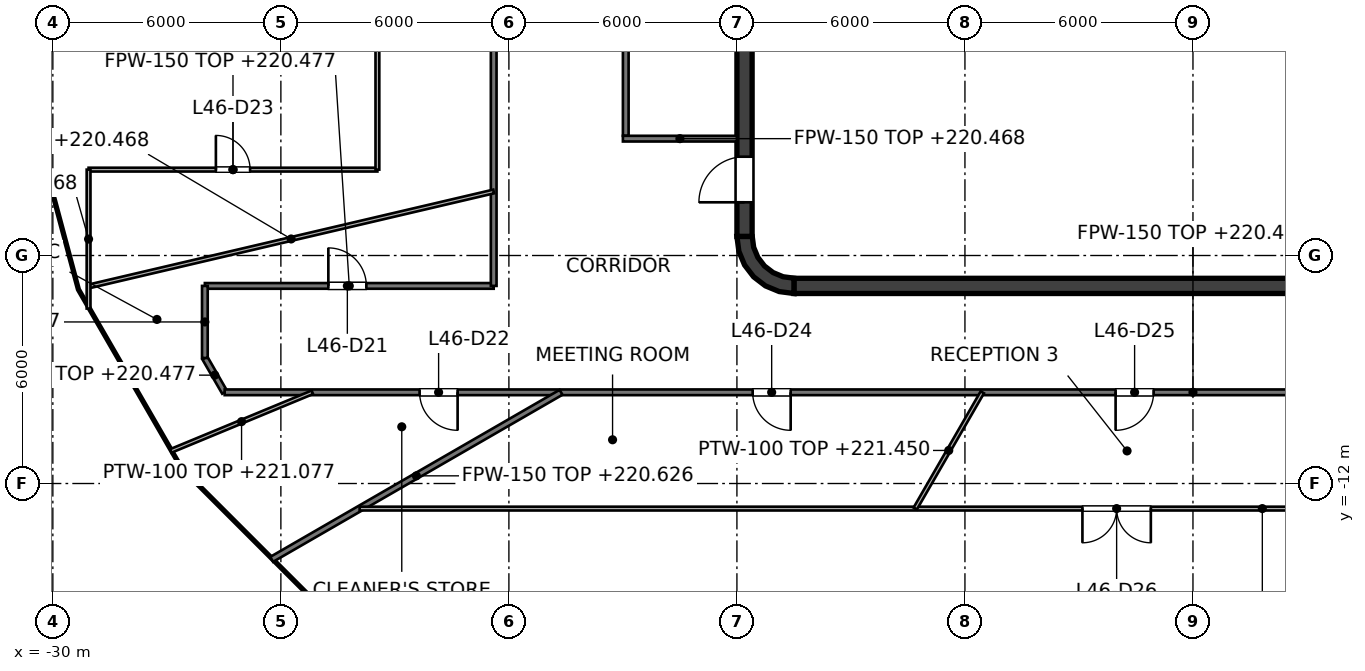
"""IFC4 building model, lengths in metres.
Left out: names, types, materials, properties, quantities, classifications, styles, units other than length and angle.
Written with IfcOpenShell. Run it as: python <this file> out.ifc"""

import sys

from ifc_helpers import new_model, si_unit, direction, frame, frame_2d, origin, place, context, subcontext, project, spatial, polyline, rectangle, outline, extrude, element, fill, save


model = new_model("IFC4")
c1 = context("Model", 3, precision=1e-05, world=origin(), true_north=direction((0.0, 1.0)))
c2 = subcontext(c1, "Body", "Model", "MODEL_VIEW")
j1 = project(units=[si_unit("LENGTHUNIT", "METRE"), si_unit("PLANEANGLEUNIT", "RADIAN")], contexts=[c1])
p1 = place(None, origin())
s1 = spatial("IfcSite", under=j1, at=p1, CompositionType="ELEMENT")
p2 = place(p1, origin())
s2 = spatial("IfcBuilding", under=s1, at=p2, CompositionType="ELEMENT")
p3 = place(p2, frame((0.0, 0.0, 217.6)))
s3 = spatial("IfcBuildingStorey", under=s2, at=p3, CompositionType="ELEMENT", Elevation=217.6)
p4 = place(p3, frame((-10.5, -6.8, 0.0), z_axis=(0.0, 0.0, 1.0), x_axis=(1.0, 0.0, 0.0)))
e1 = element("IfcWall", 1, at=p4, inside=s3, PredefinedType="SHEAR", context=c2, shape_type="SweptSolid", body=[
    extrude(rectangle(XDim=21.0, YDim=0.4, at=frame_2d((10.5, 0.0))), origin(), (0.0, 0.0, 1.0), 4.0),
])
p5 = place(p3, frame((-11.8, -5.5, 0.0), z_axis=(0.0, 0.0, 1.0), x_axis=(0.0, 1.0, 0.0)))
e2 = element("IfcWall", 2, at=p5, inside=s3, PredefinedType="SHEAR", context=c2, shape_type="SweptSolid", body=[
    extrude(rectangle(XDim=11.0, YDim=0.4, at=frame_2d((5.5, 0.0))), origin(), (0.0, 0.0, 1.0), 4.0),
])
p6 = place(p5, frame((5.0, 0.0, 0.0)))
e3 = element("IfcOpeningElement", 3, at=p6, cuts=e2, PredefinedType="OPENING", context=c2, shape_type="SweptSolid", body=[
    extrude(rectangle(XDim=1.0, YDim=2.1, at=frame_2d((0.5, 1.05))), frame((0.0, 0.2, 0.0), z_axis=(0.0, -1.0, 0.0), x_axis=(1.0, 0.0, 0.0)), (0.0, 0.0, 1.0), 0.4),
])
p7 = place(p5, frame((0.9, 0.0, 0.0)))
e4 = element("IfcOpeningElement", 4, at=p7, cuts=e2, PredefinedType="OPENING", context=c2, shape_type="SweptSolid", body=[
    extrude(rectangle(XDim=1.2, YDim=2.1, at=frame_2d((0.6, 1.05))), frame((0.0, 0.2, 0.0), z_axis=(0.0, -1.0, 0.0), x_axis=(1.0, 0.0, 0.0)), (0.0, 0.0, 1.0), 0.4),
])
p8 = place(p5, frame((8.9, 0.0, 0.0)))
e5 = element("IfcOpeningElement", 5, at=p8, cuts=e2, PredefinedType="OPENING", context=c2, shape_type="SweptSolid", body=[
    extrude(rectangle(XDim=1.2, YDim=2.1, at=frame_2d((0.6, 1.05))), frame((0.0, 0.2, 0.0), z_axis=(0.0, -1.0, 0.0), x_axis=(1.0, 0.0, 0.0)), (0.0, 0.0, 1.0), 0.4),
])
p9 = place(p3, origin())
e6 = element("IfcWall", 6, at=p9, inside=s3, PredefinedType="SHEAR", context=c2, shape_type="SweptSolid", body=[
    extrude(outline(polyline([(-10.5, -7.0), (-10.5, -6.596), (-10.784, -6.559), (-11.048, -6.45), (-11.275, -6.275), (-11.45, -6.048), (-11.559, -5.784), (-11.596, -5.5), (-12.0, -5.5), (-11.949, -5.888), (-11.799, -6.25), (-11.561, -6.561), (-11.25, -6.799), (-10.888, -6.949), (-10.5, -7.0)])), origin(), (0.0, 0.0, 1.0), 4.0),
])
p10 = place(p3, frame((1.5, -6.6, 0.0), z_axis=(0.0, 0.0, 1.0), x_axis=(0.0, 1.0, 0.0)))
e7 = element("IfcWall", 7, at=p10, inside=s3, PredefinedType="PARTITIONING", context=c2, shape_type="SweptSolid", body=[
    extrude(rectangle(XDim=2.5, YDim=0.15, at=frame_2d((1.25, 0.0))), origin(), (0.0, 0.0, 1.0), 3.85),
])
p11 = place(p10, frame((0.8, 0.0, 0.0)))
e8 = element("IfcOpeningElement", 8, at=p11, cuts=e7, PredefinedType="OPENING", context=c2, shape_type="SweptSolid", body=[
    extrude(rectangle(XDim=0.9, YDim=2.1, at=frame_2d((0.45, 1.05))), frame((0.0, 0.075, 0.0), z_axis=(0.0, -1.0, 0.0), x_axis=(1.0, 0.0, 0.0)), (0.0, 0.0, 1.0), 0.15),
])
p12 = place(p3, frame((-9.0, -6.6, 0.0), z_axis=(0.0, 0.0, 1.0), x_axis=(0.0, 1.0, 0.0)))
e9 = element("IfcWall", 9, at=p12, inside=s3, PredefinedType="PARTITIONING", context=c2, shape_type="SweptSolid", body=[
    extrude(rectangle(XDim=2.5, YDim=0.25, at=frame_2d((1.25, 0.0))), origin(), (0.0, 0.0, 1.0), 3.85),
])
p13 = place(p12, frame((0.75, 0.0, 0.0)))
e10 = element("IfcOpeningElement", 10, at=p13, cuts=e9, PredefinedType="OPENING", context=c2, shape_type="SweptSolid", body=[
    extrude(rectangle(XDim=1.0, YDim=2.1, at=frame_2d((0.5, 1.05))), frame((0.0, 0.125, 0.0), z_axis=(0.0, -1.0, 0.0), x_axis=(1.0, 0.0, 0.0)), (0.0, 0.0, 1.0), 0.25),
])
p14 = place(p3, frame((-2.9, -6.6, 0.0), z_axis=(0.0, 0.0, 1.0), x_axis=(0.0, 1.0, 0.0)))
e11 = element("IfcWall", 11, at=p14, inside=s3, PredefinedType="PARTITIONING", context=c2, shape_type="SweptSolid", body=[
    extrude(rectangle(XDim=2.5, YDim=0.25, at=frame_2d((1.25, 0.0))), origin(), (0.0, 0.0, 1.0), 3.85),
])
p15 = place(p14, frame((0.8, 0.0, 0.0)))
e12 = element("IfcOpeningElement", 12, at=p15, cuts=e11, PredefinedType="OPENING", context=c2, shape_type="SweptSolid", body=[
    extrude(rectangle(XDim=0.9, YDim=2.1, at=frame_2d((0.45, 1.05))), frame((0.0, 0.125, 0.0), z_axis=(0.0, -1.0, 0.0), x_axis=(1.0, 0.0, 0.0)), (0.0, 0.0, 1.0), 0.25),
])
p16 = place(p3, frame((-9.125, -1.525, 0.0), z_axis=(0.0, 0.0, 1.0), x_axis=(1.0, 0.0, 0.0)))
e13 = element("IfcWall", 13, at=p16, inside=s3, PredefinedType="SOLIDWALL", context=c2, shape_type="SweptSolid", body=[
    extrude(rectangle(XDim=18.25, YDim=0.25, at=frame_2d((9.125, 0.0))), origin(), (0.0, 0.0, 1.0), 3.85),
])
p17 = place(p16, frame((7.15, 0.0, 0.0)))
e14 = element("IfcOpeningElement", 14, at=p17, cuts=e13, PredefinedType="OPENING", context=c2, shape_type="SweptSolid", body=[
    extrude(rectangle(XDim=1.2, YDim=2.1, at=frame_2d((0.6, 1.05))), frame((0.0, 0.125, 0.0), z_axis=(0.0, -1.0, 0.0), x_axis=(1.0, 0.0, 0.0)), (0.0, 0.0, 1.0), 0.25),
])
p18 = place(p16, frame((10.2, 0.0, 0.0)))
e15 = element("IfcOpeningElement", 15, at=p18, cuts=e13, PredefinedType="OPENING", context=c2, shape_type="SweptSolid", body=[
    extrude(rectangle(XDim=1.2, YDim=2.1, at=frame_2d((0.6, 1.05))), frame((0.0, 0.125, 0.0), z_axis=(0.0, -1.0, 0.0), x_axis=(1.0, 0.0, 0.0)), (0.0, 0.0, 1.0), 0.25),
])
p19 = place(p16, frame((16.075, 0.0, 0.0)))
e16 = element("IfcOpeningElement", 16, at=p19, cuts=e13, PredefinedType="OPENING", context=c2, shape_type="SweptSolid", body=[
    extrude(rectangle(XDim=1.0, YDim=2.1, at=frame_2d((0.5, 1.05))), frame((0.0, 0.125, 0.0), z_axis=(0.0, -1.0, 0.0), x_axis=(1.0, 0.0, 0.0)), (0.0, 0.0, 1.0), 0.25),
])
p20 = place(p3, frame((-9.125, -3.975, 0.0), z_axis=(0.0, 0.0, 1.0), x_axis=(1.0, 0.0, 0.0)))
e17 = element("IfcWall", 17, at=p20, inside=s3, PredefinedType="SOLIDWALL", context=c2, shape_type="SweptSolid", body=[
    extrude(rectangle(XDim=12.4, YDim=0.25, at=frame_2d((6.2, 0.0))), origin(), (0.0, 0.0, 1.0), 3.85),
])
p21 = place(p20, frame((1.05, 0.0, 0.0)))
e18 = element("IfcOpeningElement", 18, at=p21, cuts=e17, PredefinedType="OPENING", context=c2, shape_type="SweptSolid", body=[
    extrude(rectangle(XDim=1.2, YDim=2.1, at=frame_2d((0.6, 1.05))), frame((0.0, 0.125, 0.0), z_axis=(0.0, -1.0, 0.0), x_axis=(1.0, 0.0, 0.0)), (0.0, 0.0, 1.0), 0.25),
])
p22 = place(p20, frame((4.1, 0.0, 0.0)))
e19 = element("IfcOpeningElement", 19, at=p22, cuts=e17, PredefinedType="OPENING", context=c2, shape_type="SweptSolid", body=[
    extrude(rectangle(XDim=1.2, YDim=2.1, at=frame_2d((0.6, 1.05))), frame((0.0, 0.125, 0.0), z_axis=(0.0, -1.0, 0.0), x_axis=(1.0, 0.0, 0.0)), (0.0, 0.0, 1.0), 0.25),
])
for number, where, z_axis, x_axis in (
    (20, (-9.0, -3.85, 0.0), (0.0, 0.0, 1.0), (0.0, 1.0, 0.0)),
    (21, (-5.95, -3.85, 0.0), (0.0, 0.0, 1.0), (0.0, 1.0, 0.0)),
    (22, (-2.9, -3.85, 0.0), (0.0, 0.0, 1.0), (0.0, 1.0, 0.0)),
    (23, (0.15, -3.85, 0.0), (0.0, 0.0, 1.0), (0.0, 1.0, 0.0)),
):
    element("IfcWall", number, at=place(p3, frame(where, z_axis=z_axis, x_axis=x_axis)), inside=s3, PredefinedType="SOLIDWALL", context=c2, shape_type="SweptSolid", body=[
        extrude(rectangle(XDim=2.2, YDim=0.25, at=frame_2d((1.1, 0.0))), origin(), (0.0, 0.0, 1.0), 3.85),
    ])
p23 = place(p3, frame((-14.925, -2.85, 0.0), z_axis=(0.0, 0.0, 1.0), x_axis=(0.0, 1.0, 0.0)))
e24 = element("IfcWall", 24, at=p23, inside=s3, PredefinedType="PARTITIONING", context=c2, shape_type="SweptSolid", body=[
    extrude(rectangle(XDim=5.7, YDim=0.15, at=frame_2d((2.85, 0.0))), origin(), (0.0, 0.0, 1.0), 2.868),
])
p24 = place(p3, frame((-15.0, -2.925, 0.0), z_axis=(0.0, 0.0, 1.0), x_axis=(1.0, 0.0, 0.0)))
e25 = element("IfcWall", 25, at=p24, inside=s3, PredefinedType="PARTITIONING", context=c2, shape_type="SweptSolid", body=[
    extrude(rectangle(XDim=3.0, YDim=0.15, at=frame_2d((1.5, 0.0))), origin(), (0.0, 0.0, 1.0), 2.868),
])
p25 = place(p3, frame((-26.0, -8.697, 0.0), z_axis=(0.0, 0.0, 1.0), x_axis=(0.499715696113, -0.8661894845, 0.0)))
e26 = element("IfcWall", 26, at=p25, inside=s3, PredefinedType="PARTITIONING", context=c2, shape_type="SweptSolid", body=[
    extrude(rectangle(XDim=1.042, YDim=0.15, at=frame_2d((0.521, 0.0))), origin(), (0.0, 0.0, 1.0), 2.877),
])
p26 = place(p3, frame((-25.479, -9.6, 0.0), z_axis=(0.0, 0.0, 1.0), x_axis=(1.0, 0.0, 0.0)))
e27 = element("IfcWall", 27, at=p26, inside=s3, PredefinedType="PARTITIONING", context=c2, shape_type="SweptSolid", body=[
    extrude(rectangle(XDim=50.958, YDim=0.15, at=frame_2d((25.479, 0.0))), origin(), (0.0, 0.0, 1.0), 2.877),
])
p27 = place(p26, frame((5.129, 0.0, 0.0)))
e28 = element("IfcOpeningElement", 28, at=p27, cuts=e27, PredefinedType="OPENING", context=c2, shape_type="SweptSolid", body=[
    extrude(rectangle(XDim=1.0, YDim=2.1, at=frame_2d((0.5, 1.05))), frame((0.0, 0.075, 0.0), z_axis=(0.0, -1.0, 0.0), x_axis=(1.0, 0.0, 0.0)), (0.0, 0.0, 1.0), 0.15),
])
p28 = place(p26, frame((13.894, 0.0, 0.0)))
e29 = element("IfcOpeningElement", 29, at=p28, cuts=e27, PredefinedType="OPENING", context=c2, shape_type="SweptSolid", body=[
    extrude(rectangle(XDim=1.0, YDim=2.1, at=frame_2d((0.5, 1.05))), frame((0.0, 0.075, 0.0), z_axis=(0.0, -1.0, 0.0), x_axis=(1.0, 0.0, 0.0)), (0.0, 0.0, 1.0), 0.15),
])
p29 = place(p26, frame((23.443, 0.0, 0.0)))
e30 = element("IfcOpeningElement", 30, at=p29, cuts=e27, PredefinedType="OPENING", context=c2, shape_type="SweptSolid", body=[
    extrude(rectangle(XDim=1.0, YDim=2.1, at=frame_2d((0.5, 1.05))), frame((0.0, 0.075, 0.0), z_axis=(0.0, -1.0, 0.0), x_axis=(1.0, 0.0, 0.0)), (0.0, 0.0, 1.0), 0.15),
])
p30 = place(p26, frame((29.757, 0.0, 0.0)))
e31 = element("IfcOpeningElement", 31, at=p30, cuts=e27, PredefinedType="OPENING", context=c2, shape_type="SweptSolid", body=[
    extrude(rectangle(XDim=1.0, YDim=2.1, at=frame_2d((0.5, 1.05))), frame((0.0, 0.075, 0.0), z_axis=(0.0, -1.0, 0.0), x_axis=(1.0, 0.0, 0.0)), (0.0, 0.0, 1.0), 0.15),
])
p31 = place(p26, frame((36.11, 0.0, 0.0)))
e32 = element("IfcOpeningElement", 32, at=p31, cuts=e27, PredefinedType="OPENING", context=c2, shape_type="SweptSolid", body=[
    extrude(rectangle(XDim=1.0, YDim=2.1, at=frame_2d((0.5, 1.05))), frame((0.0, 0.075, 0.0), z_axis=(0.0, -1.0, 0.0), x_axis=(1.0, 0.0, 0.0)), (0.0, 0.0, 1.0), 0.15),
])
p32 = place(p26, frame((45.258, 0.0, 0.0)))
e33 = element("IfcOpeningElement", 33, at=p32, cuts=e27, PredefinedType="OPENING", context=c2, shape_type="SweptSolid", body=[
    extrude(rectangle(XDim=1.2, YDim=2.1, at=frame_2d((0.6, 1.05))), frame((0.0, 0.075, 0.0), z_axis=(0.0, -1.0, 0.0), x_axis=(1.0, 0.0, 0.0)), (0.0, 0.0, 1.0), 0.15),
])
p33 = place(p3, frame((-26.0, -6.8, 0.0), z_axis=(0.0, 0.0, 1.0), x_axis=(1.0, 0.0, 0.0)))
e34 = element("IfcWall", 34, at=p33, inside=s3, PredefinedType="PARTITIONING", context=c2, shape_type="SweptSolid", body=[
    extrude(rectangle(XDim=7.6, YDim=0.15, at=frame_2d((3.8, 0.0))), origin(), (0.0, 0.0, 1.0), 2.877),
])
p34 = place(p33, frame((3.249, 0.0, 0.0)))
e35 = element("IfcOpeningElement", 35, at=p34, cuts=e34, PredefinedType="OPENING", context=c2, shape_type="SweptSolid", body=[
    extrude(rectangle(XDim=1.0, YDim=2.1, at=frame_2d((0.5, 1.05))), frame((0.0, 0.075, 0.0), z_axis=(0.0, -1.0, 0.0), x_axis=(1.0, 0.0, 0.0)), (0.0, 0.0, 1.0), 0.15),
])
p35 = place(p3, frame((-24.242, -13.996, 0.0), z_axis=(0.0, 0.0, 1.0), x_axis=(0.86602327363, 0.500003689518, 0.0)))
e36 = element("IfcWall", 36, at=p35, inside=s3, PredefinedType="PARTITIONING", context=c2, shape_type="SweptSolid", body=[
    extrude(rectangle(XDim=8.792, YDim=0.15, at=frame_2d((4.396, 0.0))), origin(), (0.0, 0.0, 1.0), 3.026),
])
p36 = place(p3, frame((-18.4, -6.8, 0.0), z_axis=(0.0, 0.0, 1.0), x_axis=(0.0, 1.0, 0.0)))
e37 = element("IfcWall", 37, at=p36, inside=s3, PredefinedType="PARTITIONING", context=c2, shape_type="SweptSolid", body=[
    extrude(rectangle(XDim=13.6, YDim=0.15, at=frame_2d((6.8, 0.0))), origin(), (0.0, 0.0, 1.0), 2.868),
])
p37 = place(p3, frame((-26.0, -8.697, 0.0), z_axis=(0.0, 0.0, 1.0), x_axis=(0.0, 1.0, 0.0)))
e38 = element("IfcWall", 38, at=p37, inside=s3, PredefinedType="PARTITIONING", context=c2, shape_type="SweptSolid", body=[
    extrude(rectangle(XDim=1.897, YDim=0.15, at=frame_2d((0.948, 0.0))), origin(), (0.0, 0.0, 1.0), 2.877),
])
p38 = place(p3, frame((-21.928, -12.66, 0.0), z_axis=(0.0, 0.0, 1.0), x_axis=(1.0, 0.0, 0.0)))
e39 = element("IfcWall", 39, at=p38, inside=s3, PredefinedType="PARTITIONING", context=c2, shape_type="SweptSolid", body=[
    extrude(rectangle(XDim=47.506, YDim=0.1, at=frame_2d((23.753, 0.0))), origin(), (0.0, 0.0, 1.0), 2.877),
])
p39 = place(p38, frame((19.02, 0.0, 0.0)))
e40 = element("IfcOpeningElement", 40, at=p39, cuts=e39, PredefinedType="OPENING", context=c2, shape_type="SweptSolid", body=[
    extrude(rectangle(XDim=1.8, YDim=2.1, at=frame_2d((0.9, 1.05))), frame((0.0, 0.05, 0.0), z_axis=(0.0, -1.0, 0.0), x_axis=(1.0, 0.0, 0.0)), (0.0, 0.0, 1.0), 0.1),
])
p40 = place(p38, frame((44.492, 0.0, 0.0)))
e41 = element("IfcOpeningElement", 41, at=p40, cuts=e39, PredefinedType="OPENING", context=c2, shape_type="SweptSolid", body=[
    extrude(rectangle(XDim=0.9, YDim=2.1, at=frame_2d((0.45, 1.05))), frame((0.0, 0.05, 0.0), z_axis=(0.0, -1.0, 0.0), x_axis=(1.0, 0.0, 0.0)), (0.0, 0.0, 1.0), 0.1),
])
p41 = place(p3, frame((-29.06, -3.74, 0.0), z_axis=(0.0, 0.0, 1.0), x_axis=(1.0, 0.0, 0.0)))
e42 = element("IfcWall", 42, at=p41, inside=s3, PredefinedType="PARTITIONING", context=c2, shape_type="SweptSolid", body=[
    extrude(rectangle(XDim=7.6, YDim=0.1, at=frame_2d((3.8, 0.0))), origin(), (0.0, 0.0, 1.0), 2.877),
])
p42 = place(p41, frame((3.35, 0.0, 0.0)))
e43 = element("IfcOpeningElement", 43, at=p42, cuts=e42, PredefinedType="OPENING", context=c2, shape_type="SweptSolid", body=[
    extrude(rectangle(XDim=0.9, YDim=2.1, at=frame_2d((0.45, 1.05))), frame((0.0, 0.05, 0.0), z_axis=(0.0, -1.0, 0.0), x_axis=(1.0, 0.0, 0.0)), (0.0, 0.0, 1.0), 0.1),
])
p43 = place(p3, frame((-29.06, -6.815, 0.0), z_axis=(0.0, 0.0, 1.0), x_axis=(0.973585340427, 0.22832342172, 0.0)))
e44 = element("IfcWall", 44, at=p43, inside=s3, PredefinedType="PARTITIONING", context=c2, shape_type="SweptSolid", body=[
    extrude(rectangle(XDim=10.949, YDim=0.1, at=frame_2d((5.475, 0.0))), origin(), (0.0, 0.0, 1.0), 2.868),
])
p44 = place(p3, frame((-26.897, -11.143, 0.0), z_axis=(0.0, 0.0, 1.0), x_axis=(0.923872174496, 0.382701195701, 0.0)))
e45 = element("IfcWall", 45, at=p44, inside=s3, PredefinedType="PARTITIONING", context=c2, shape_type="SweptSolid", body=[
    extrude(rectangle(XDim=4.032, YDim=0.1, at=frame_2d((2.016, 0.0))), origin(), (0.0, 0.0, 1.0), 3.477),
])
p45 = place(p3, frame((-7.309, -12.66, 0.0), z_axis=(0.0, 0.0, 1.0), x_axis=(0.499899920428, 0.866083177042, 0.0)))
e46 = element("IfcWall", 46, at=p45, inside=s3, PredefinedType="PARTITIONING", context=c2, shape_type="SweptSolid", body=[
    extrude(rectangle(XDim=3.533, YDim=0.1, at=frame_2d((1.767, 0.0))), origin(), (0.0, 0.0, 1.0), 3.85),
])
p46 = place(p3, frame((-21.46, -3.74, 0.0), z_axis=(0.0, 0.0, 1.0), x_axis=(0.0, 1.0, 0.0)))
e47 = element("IfcWall", 47, at=p46, inside=s3, PredefinedType="PARTITIONING", context=c2, shape_type="SweptSolid", body=[
    extrude(rectangle(XDim=7.48, YDim=0.1, at=frame_2d((3.74, 0.0))), origin(), (0.0, 0.0, 1.0), 2.868),
])
p47 = place(p3, frame((-29.06, -7.396, 0.0), z_axis=(0.0, 0.0, 1.0), x_axis=(0.0, 1.0, 0.0)))
e48 = element("IfcWall", 48, at=p47, inside=s3, PredefinedType="PARTITIONING", context=c2, shape_type="SweptSolid", body=[
    extrude(rectangle(XDim=3.656, YDim=0.1, at=frame_2d((1.828, 0.0))), origin(), (0.0, 0.0, 1.0), 2.868),
])
p48 = place(p21, origin())
e49 = element("IfcDoor", 49, at=p48, inside=s3, OperationType="DOUBLE_DOOR_SLIDING", PredefinedType="DOOR", context=c2, shape_type="SweptSolid", body=[
    extrude(rectangle(XDim=1.2, YDim=2.1, at=frame_2d((0.6, 1.05))), frame((0.0, 0.025, 0.0), z_axis=(0.0, -1.0, 0.0), x_axis=(1.0, 0.0, 0.0)), (0.0, 0.0, 1.0), 0.05),
])
fill(e18, e49)
p49 = place(p22, origin())
e50 = element("IfcDoor", 50, at=p49, inside=s3, OperationType="DOUBLE_DOOR_SLIDING", PredefinedType="DOOR", context=c2, shape_type="SweptSolid", body=[
    extrude(rectangle(XDim=1.2, YDim=2.1, at=frame_2d((0.6, 1.05))), frame((0.0, 0.025, 0.0), z_axis=(0.0, -1.0, 0.0), x_axis=(1.0, 0.0, 0.0)), (0.0, 0.0, 1.0), 0.05),
])
fill(e19, e50)
p50 = place(p17, origin())
e51 = element("IfcDoor", 51, at=p50, inside=s3, OperationType="DOUBLE_DOOR_SLIDING", PredefinedType="DOOR", context=c2, shape_type="SweptSolid", body=[
    extrude(rectangle(XDim=1.2, YDim=2.1, at=frame_2d((0.6, 1.05))), frame((0.0, 0.025, 0.0), z_axis=(0.0, -1.0, 0.0), x_axis=(1.0, 0.0, 0.0)), (0.0, 0.0, 1.0), 0.05),
])
fill(e14, e51)
p51 = place(p18, origin())
e52 = element("IfcDoor", 52, at=p51, inside=s3, OperationType="DOUBLE_DOOR_SLIDING", PredefinedType="DOOR", context=c2, shape_type="SweptSolid", body=[
    extrude(rectangle(XDim=1.2, YDim=2.1, at=frame_2d((0.6, 1.05))), frame((0.0, 0.025, 0.0), z_axis=(0.0, -1.0, 0.0), x_axis=(1.0, 0.0, 0.0)), (0.0, 0.0, 1.0), 0.05),
])
fill(e15, e52)
p52 = place(p13, origin())
e53 = element("IfcDoor", 53, at=p52, inside=s3, OperationType="SINGLE_SWING_LEFT", PredefinedType="DOOR", context=c2, shape_type="SweptSolid", body=[
    extrude(rectangle(XDim=1.0, YDim=2.1, at=frame_2d((0.5, 1.05))), frame((0.0, 0.025, 0.0), z_axis=(0.0, -1.0, 0.0), x_axis=(1.0, 0.0, 0.0)), (0.0, 0.0, 1.0), 0.05),
])
fill(e10, e53)
p53 = place(p15, origin())
e54 = element("IfcDoor", 54, at=p53, inside=s3, OperationType="SINGLE_SWING_RIGHT", PredefinedType="DOOR", context=c2, shape_type="SweptSolid", body=[
    extrude(rectangle(XDim=0.9, YDim=2.1, at=frame_2d((0.45, 1.05))), frame((0.0, 0.025, 0.0), z_axis=(0.0, -1.0, 0.0), x_axis=(1.0, 0.0, 0.0)), (0.0, 0.0, 1.0), 0.05),
])
fill(e12, e54)
p54 = place(p11, origin())
e55 = element("IfcDoor", 55, at=p54, inside=s3, OperationType="SINGLE_SWING_RIGHT", PredefinedType="DOOR", context=c2, shape_type="SweptSolid", body=[
    extrude(rectangle(XDim=0.9, YDim=2.1, at=frame_2d((0.45, 1.05))), frame((0.0, 0.025, 0.0), z_axis=(0.0, -1.0, 0.0), x_axis=(1.0, 0.0, 0.0)), (0.0, 0.0, 1.0), 0.05),
])
fill(e8, e55)
p55 = place(p7, origin())
e56 = element("IfcDoor", 56, at=p55, inside=s3, OperationType="SINGLE_SWING_LEFT", PredefinedType="DOOR", context=c2, shape_type="SweptSolid", body=[
    extrude(rectangle(XDim=1.2, YDim=2.1, at=frame_2d((0.6, 1.05))), frame((0.0, 0.025, 0.0), z_axis=(0.0, -1.0, 0.0), x_axis=(1.0, 0.0, 0.0)), (0.0, 0.0, 1.0), 0.05),
])
fill(e4, e56)
p56 = place(p34, origin())
e57 = element("IfcDoor", 57, at=p56, inside=s3, OperationType="SINGLE_SWING_LEFT", PredefinedType="DOOR", context=c2, shape_type="SweptSolid", body=[
    extrude(rectangle(XDim=1.0, YDim=2.1, at=frame_2d((0.5, 1.05))), frame((0.0, 0.025, 0.0), z_axis=(0.0, -1.0, 0.0), x_axis=(1.0, 0.0, 0.0)), (0.0, 0.0, 1.0), 0.05),
])
fill(e35, e57)
p57 = place(p27, origin())
e58 = element("IfcDoor", 58, at=p57, inside=s3, OperationType="SINGLE_SWING_RIGHT", PredefinedType="DOOR", context=c2, shape_type="SweptSolid", body=[
    extrude(rectangle(XDim=1.0, YDim=2.1, at=frame_2d((0.5, 1.05))), frame((0.0, 0.025, 0.0), z_axis=(0.0, -1.0, 0.0), x_axis=(1.0, 0.0, 0.0)), (0.0, 0.0, 1.0), 0.05),
])
fill(e28, e58)
p58 = place(p42, origin())
e59 = element("IfcDoor", 59, at=p58, inside=s3, OperationType="SINGLE_SWING_LEFT", PredefinedType="DOOR", context=c2, shape_type="SweptSolid", body=[
    extrude(rectangle(XDim=0.9, YDim=2.1, at=frame_2d((0.45, 1.05))), frame((0.0, 0.025, 0.0), z_axis=(0.0, -1.0, 0.0), x_axis=(1.0, 0.0, 0.0)), (0.0, 0.0, 1.0), 0.05),
])
fill(e43, e59)
p59 = place(p28, origin())
e60 = element("IfcDoor", 60, at=p59, inside=s3, OperationType="SINGLE_SWING_RIGHT", PredefinedType="DOOR", context=c2, shape_type="SweptSolid", body=[
    extrude(rectangle(XDim=1.0, YDim=2.1, at=frame_2d((0.5, 1.05))), frame((0.0, 0.025, 0.0), z_axis=(0.0, -1.0, 0.0), x_axis=(1.0, 0.0, 0.0)), (0.0, 0.0, 1.0), 0.05),
])
fill(e29, e60)
p60 = place(p29, origin())
e61 = element("IfcDoor", 61, at=p60, inside=s3, OperationType="SINGLE_SWING_LEFT", PredefinedType="DOOR", context=c2, shape_type="SweptSolid", body=[
    extrude(rectangle(XDim=1.0, YDim=2.1, at=frame_2d((0.5, 1.05))), frame((0.0, 0.025, 0.0), z_axis=(0.0, -1.0, 0.0), x_axis=(1.0, 0.0, 0.0)), (0.0, 0.0, 1.0), 0.05),
])
fill(e30, e61)
p61 = place(p39, origin())
e62 = element("IfcDoor", 62, at=p61, inside=s3, OperationType="DOUBLE_DOOR_SINGLE_SWING", PredefinedType="DOOR", context=c2, shape_type="SweptSolid", body=[
    extrude(rectangle(XDim=1.8, YDim=2.1, at=frame_2d((0.9, 1.05))), frame((0.0, 0.025, 0.0), z_axis=(0.0, -1.0, 0.0), x_axis=(1.0, 0.0, 0.0)), (0.0, 0.0, 1.0), 0.05),
])
fill(e40, e62)
save(model, sys.argv[1])
